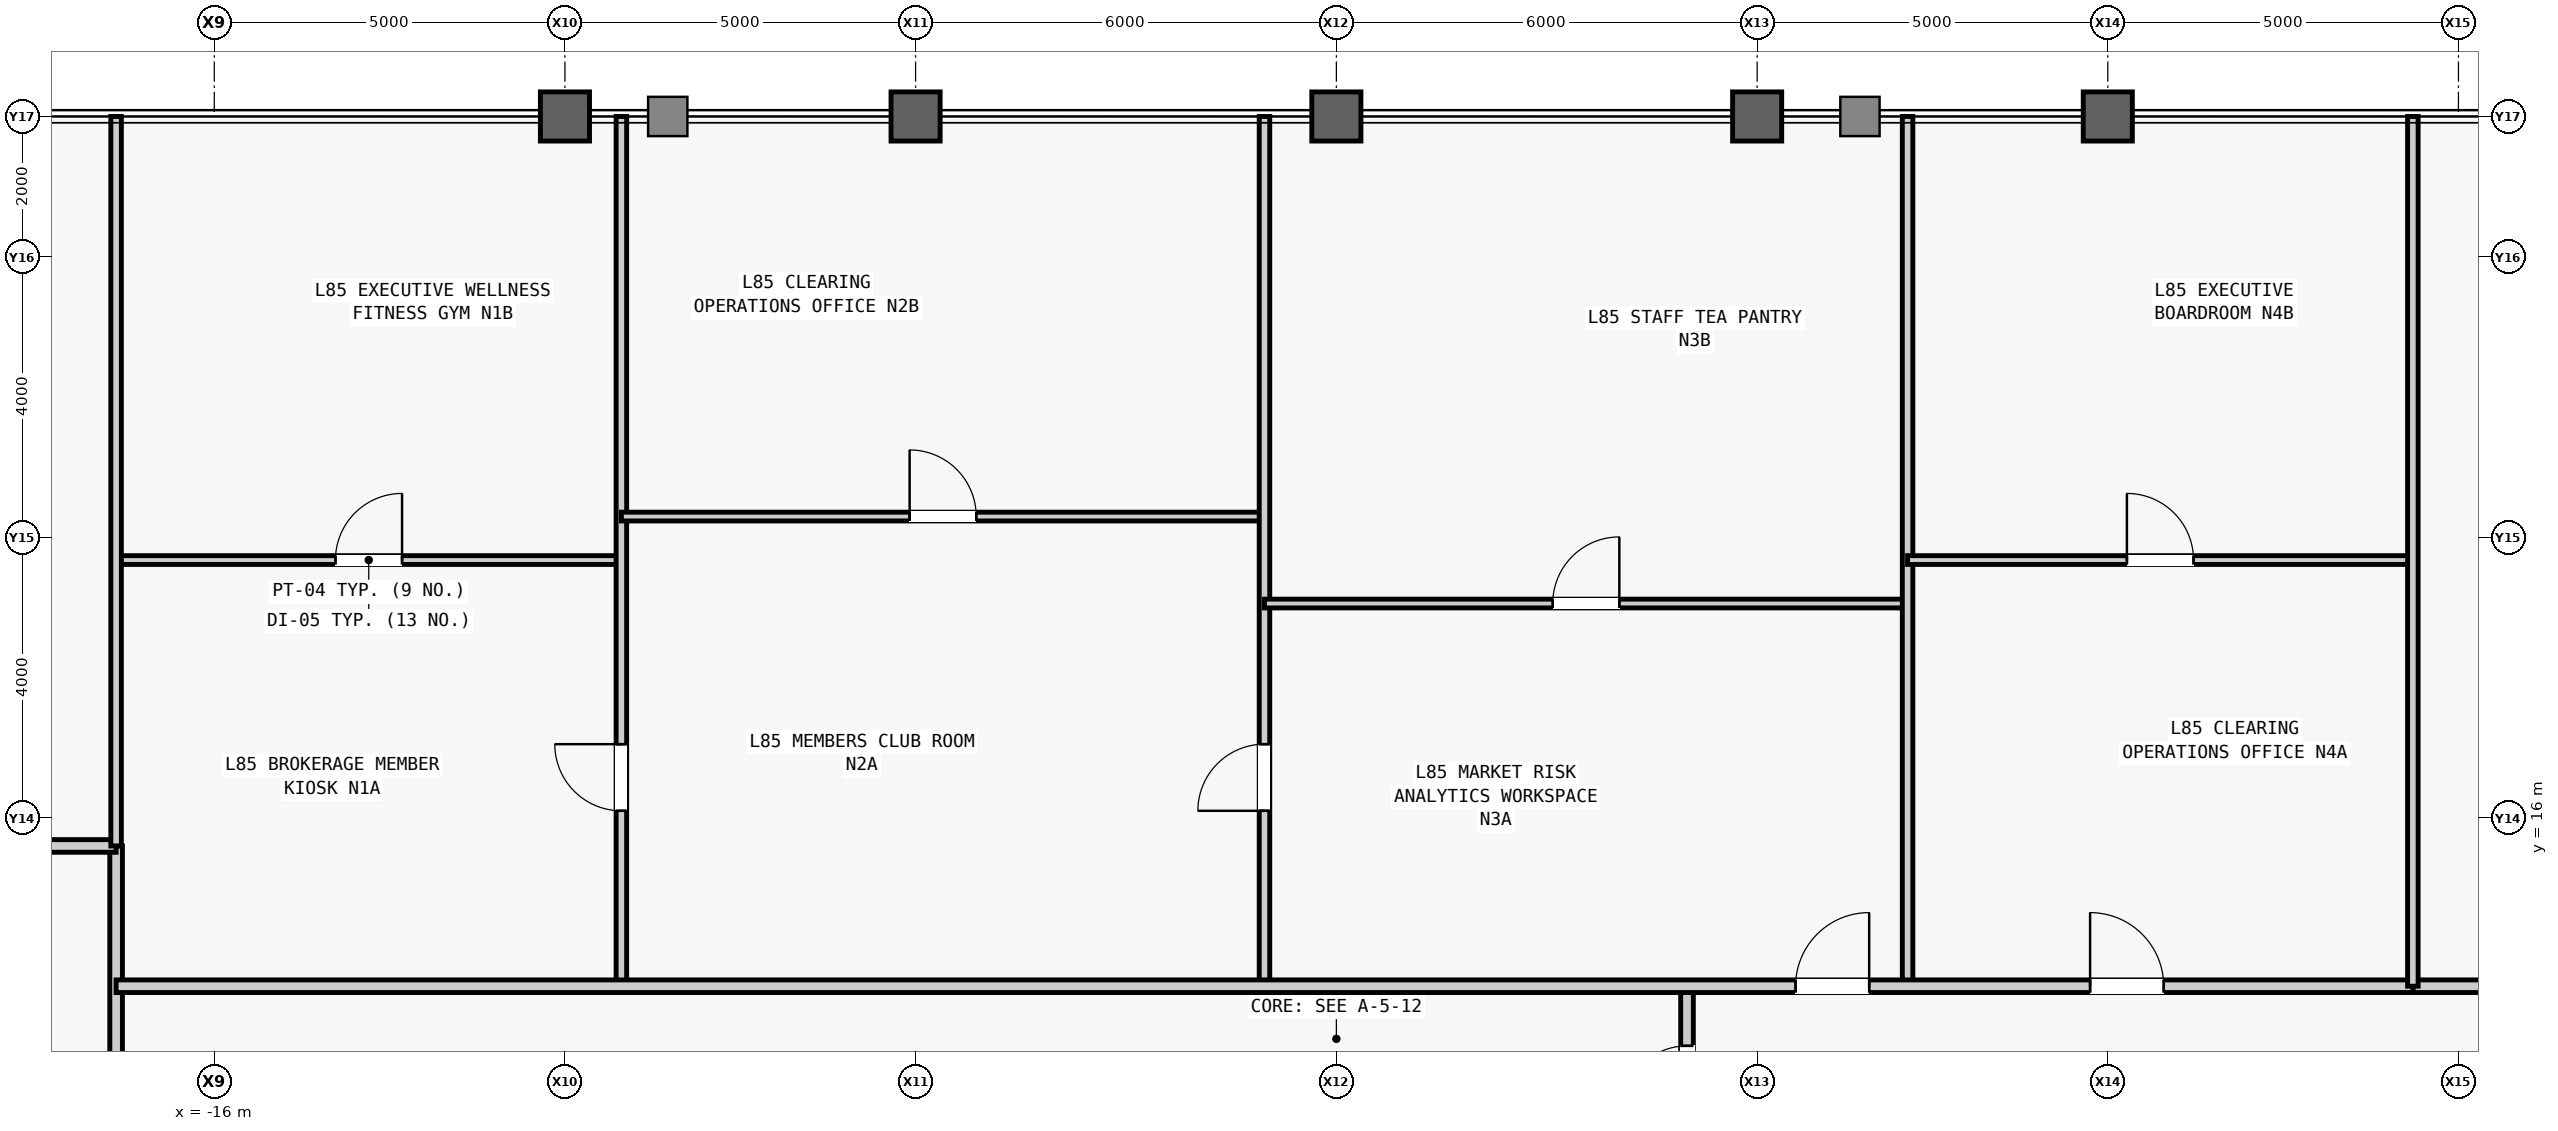
"""IFC4 building model, lengths in metres.
Left out: names, types, materials, properties, quantities, classifications, styles, units other than length and angle.
Written with IfcOpenShell. Run it as: python <this file> out.ifc"""

import sys

from ifc_helpers import new_model, si_unit, direction, frame, frame_2d, origin, origin_2d, place, context, subcontext, project, spatial, rectangle, hollow_rectangle, extrude, source, transform, mapped, element, fill, save


model = new_model("IFC4")
c1 = context("Model", 3, precision=1e-05, world=origin(), true_north=direction((0.0, 1.0)))
c2 = subcontext(c1, "Body", "Model", "MODEL_VIEW")
j1 = project(units=[si_unit("LENGTHUNIT", "METRE"), si_unit("PLANEANGLEUNIT", "RADIAN")], contexts=[c1])
p1 = place(None, origin())
s1 = spatial("IfcSite", under=j1, at=p1, CompositionType="ELEMENT")
p2 = place(p1, origin())
s2 = spatial("IfcBuilding", under=s1, at=p2, CompositionType="ELEMENT")
p3 = place(p2, frame((0.0, 0.0, 358.3)))
s3 = spatial("IfcBuildingStorey", under=s2, at=p3, CompositionType="ELEMENT", Elevation=358.3)
m1 = source(origin(), c2, "Body", "SweptSolid", [
    extrude(hollow_rectangle(XDim=0.7, YDim=0.7, WallThickness=0.04, at=origin_2d()), origin(), (0.0, 0.0, 1.0), 4.0),
])
for number, where, z_axis, x_axis in (
    (1, (-11.0, 26.0, 0.0), (0.0, 0.0, 1.0), (1.0, 0.0, 0.0)),
    (2, (-6.0, 26.0, 0.0), (0.0, 0.0, 1.0), (1.0, 0.0, 0.0)),
    (3, (0.0, 26.0, 0.0), (0.0, 0.0, 1.0), (1.0, 0.0, 0.0)),
    (4, (6.0, 26.0, 0.0), (0.0, 0.0, 1.0), (1.0, 0.0, 0.0)),
    (5, (11.0, 26.0, 0.0), (0.0, 0.0, 1.0), (1.0, 0.0, 0.0)),
):
    element("IfcColumn", number, at=place(p3, frame(where, z_axis=z_axis, x_axis=x_axis)), inside=s3, PredefinedType="COLUMN", context=c2, shape_type="MappedRepresentation", body=[
        mapped(m1, transform((0.0, 0.0, 0.0), scale=1.0)),
    ])
m2 = source(origin(), c2, "Body", "SweptSolid", [
    extrude(rectangle(XDim=8.4, YDim=0.18, at=frame_2d((4.2, 0.0))), origin(), (0.0, 0.0, 1.0), 3.74),
])
p4 = place(p3, frame((-17.4, 7.2, 0.0), z_axis=(0.0, 0.0, 1.0), x_axis=(0.0, 1.0, 0.0)))
e6 = element("IfcWall", 6, at=p4, inside=s3, PredefinedType="PARTITIONING", context=c2, shape_type="MappedRepresentation", body=[
    mapped(m2, transform((0.0, 0.0, 0.0), scale=1.0)),
])
m3 = source(origin(), c2, "Body", "SweptSolid", [
    extrude(rectangle(XDim=2.6, YDim=0.18, at=frame_2d((1.3, 0.0))), origin(), (0.0, 0.0, 1.0), 3.74),
])
p5 = place(p3, frame((5.0, 11.0, 0.0), z_axis=(0.0, 0.0, 1.0), x_axis=(0.0, 1.0, 0.0)))
e7 = element("IfcWall", 7, at=p5, inside=s3, PredefinedType="PARTITIONING", context=c2, shape_type="MappedRepresentation", body=[
    mapped(m3, transform((0.0, 0.0, 0.0), scale=1.0)),
])
m4 = source(origin(), c2, "Body", "SweptSolid", [
    extrude(rectangle(XDim=0.9, YDim=2.15, at=frame_2d((0.45, 1.075))), frame((0.0, 0.1, 0.0), z_axis=(0.0, -1.0, 0.0), x_axis=(1.0, 0.0, 0.0)), (0.0, 0.0, 1.0), 0.2),
])
p6 = place(p5, frame((0.85, 0.0, 0.0)))
e8 = element("IfcOpeningElement", 8, at=p6, cuts=e7, PredefinedType="OPENING", context=c2, shape_type="MappedRepresentation", body=[
    mapped(m4, transform((0.0, 0.0, 0.0), scale=1.0)),
])
m5 = source(origin(), c2, "Body", "SweptSolid", [
    extrude(rectangle(XDim=1.15, YDim=0.18, at=frame_2d((0.575, 0.0))), origin(), (0.0, 0.0, 1.0), 3.74),
])
p7 = place(p3, frame((-18.55, 15.6, 0.0), z_axis=(0.0, 0.0, 1.0), x_axis=(1.0, 0.0, 0.0)))
e9 = element("IfcWall", 9, at=p7, inside=s3, PredefinedType="PARTITIONING", context=c2, shape_type="MappedRepresentation", body=[
    mapped(m5, transform((0.0, 0.0, 0.0), scale=1.0)),
])
m6 = source(origin(), c2, "Body", "SweptSolid", [
    extrude(rectangle(XDim=2.4, YDim=0.18, at=frame_2d((1.2, 0.0))), origin(), (0.0, 0.0, 1.0), 3.74),
])
p8 = place(p3, frame((15.35, 13.6, 0.0), z_axis=(0.0, 0.0, 1.0), x_axis=(1.0, 0.0, 0.0)))
e10 = element("IfcWall", 10, at=p8, inside=s3, PredefinedType="PARTITIONING", context=c2, shape_type="MappedRepresentation", body=[
    mapped(m6, transform((0.0, 0.0, 0.0), scale=1.0)),
])
m7 = source(origin(), c2, "Body", "SweptSolid", [
    extrude(rectangle(XDim=7.205, YDim=0.125, at=frame_2d((3.603, 0.0))), origin(), (0.0, 0.0, 1.0), 3.393),
])
p9 = place(p3, frame((-17.4, 19.676, 0.0), z_axis=(0.0, 0.0, 1.0), x_axis=(1.0, 0.0, 0.0)))
e11 = element("IfcWall", 11, at=p9, inside=s3, PredefinedType="PARTITIONING", context=c2, shape_type="MappedRepresentation", body=[
    mapped(m7, transform((0.0, 0.0, 0.0), scale=1.0)),
])
m8 = source(origin(), c2, "Body", "SweptSolid", [
    extrude(rectangle(XDim=0.95, YDim=2.15, at=frame_2d((0.475, 1.075))), frame((0.0, 0.073, 0.0), z_axis=(0.0, -1.0, 0.0), x_axis=(1.0, 0.0, 0.0)), (0.0, 0.0, 1.0), 0.145),
])
p10 = place(p9, frame((3.127, 0.0, 0.0)))
e12 = element("IfcOpeningElement", 12, at=p10, cuts=e11, PredefinedType="OPENING", context=c2, shape_type="MappedRepresentation", body=[
    mapped(m8, transform((0.0, 0.0, 0.0), scale=1.0)),
])
m9 = source(origin(), c2, "Body", "SweptSolid", [
    extrude(rectangle(XDim=12.4, YDim=0.15, at=frame_2d((6.2, 0.0))), origin(), (0.0, 0.0, 1.0), 3.74),
])
p11 = place(p3, frame((-10.195, 13.6, 0.0), z_axis=(0.0, 0.0, 1.0), x_axis=(0.0, 1.0, 0.0)))
e13 = element("IfcWall", 13, at=p11, inside=s3, PredefinedType="PARTITIONING", context=c2, shape_type="MappedRepresentation", body=[
    mapped(m9, transform((0.0, 0.0, 0.0), scale=1.0)),
])
m10 = source(origin(), c2, "Body", "SweptSolid", [
    extrude(rectangle(XDim=0.95, YDim=2.15, at=frame_2d((0.475, 1.075))), frame((0.0, 0.085, 0.0), z_axis=(0.0, -1.0, 0.0), x_axis=(1.0, 0.0, 0.0)), (0.0, 0.0, 1.0), 0.17),
])
p12 = place(p11, frame((2.501, 0.0, 0.0)))
e14 = element("IfcOpeningElement", 14, at=p12, cuts=e13, PredefinedType="OPENING", context=c2, shape_type="MappedRepresentation", body=[
    mapped(m10, transform((0.0, 0.0, 0.0), scale=1.0)),
])
m11 = source(origin(), c2, "Body", "SweptSolid", [
    extrude(rectangle(XDim=9.17, YDim=0.125, at=frame_2d((4.585, 0.0))), origin(), (0.0, 0.0, 1.0), 3.74),
])
p13 = place(p3, frame((-10.195, 20.296, 0.0), z_axis=(0.0, 0.0, 1.0), x_axis=(1.0, 0.0, 0.0)))
e15 = element("IfcWall", 15, at=p13, inside=s3, PredefinedType="PARTITIONING", context=c2, shape_type="MappedRepresentation", body=[
    mapped(m11, transform((0.0, 0.0, 0.0), scale=1.0)),
])
p14 = place(p13, frame((4.11, 0.0, 0.0)))
e16 = element("IfcOpeningElement", 16, at=p14, cuts=e15, PredefinedType="OPENING", context=c2, shape_type="MappedRepresentation", body=[
    mapped(m8, transform((0.0, 0.0, 0.0), scale=1.0)),
])
p15 = place(p3, frame((-1.025, 13.6, 0.0), z_axis=(0.0, 0.0, 1.0), x_axis=(0.0, 1.0, 0.0)))
e17 = element("IfcWall", 17, at=p15, inside=s3, PredefinedType="PARTITIONING", context=c2, shape_type="MappedRepresentation", body=[
    mapped(m9, transform((0.0, 0.0, 0.0), scale=1.0)),
])
p16 = place(p15, frame((2.501, 0.0, 0.0)))
e18 = element("IfcOpeningElement", 18, at=p16, cuts=e17, PredefinedType="OPENING", context=c2, shape_type="MappedRepresentation", body=[
    mapped(m10, transform((0.0, 0.0, 0.0), scale=1.0)),
])
m12 = source(origin(), c2, "Body", "SweptSolid", [
    extrude(rectangle(XDim=9.17, YDim=0.125, at=frame_2d((4.585, 0.0))), origin(), (0.0, 0.0, 1.0), 3.74),
])
p17 = place(p3, frame((-1.025, 19.056, 0.0), z_axis=(0.0, 0.0, 1.0), x_axis=(1.0, 0.0, 0.0)))
e19 = element("IfcWall", 19, at=p17, inside=s3, PredefinedType="PARTITIONING", context=c2, shape_type="MappedRepresentation", body=[
    mapped(m12, transform((0.0, 0.0, 0.0), scale=1.0)),
])
p18 = place(p17, frame((4.11, 0.0, 0.0)))
e20 = element("IfcOpeningElement", 20, at=p18, cuts=e19, PredefinedType="OPENING", context=c2, shape_type="MappedRepresentation", body=[
    mapped(m8, transform((0.0, 0.0, 0.0), scale=1.0)),
])
p19 = place(p3, frame((8.145, 13.6, 0.0), z_axis=(0.0, 0.0, 1.0), x_axis=(0.0, 1.0, 0.0)))
e21 = element("IfcWall", 21, at=p19, inside=s3, PredefinedType="PARTITIONING", context=c2, shape_type="MappedRepresentation", body=[
    mapped(m9, transform((0.0, 0.0, 0.0), scale=1.0)),
])
m13 = source(origin(), c2, "Body", "SweptSolid", [
    extrude(rectangle(XDim=7.205, YDim=0.125, at=frame_2d((3.603, 0.0))), origin(), (0.0, 0.0, 1.0), 3.393),
])
p20 = place(p3, frame((8.145, 19.676, 0.0), z_axis=(0.0, 0.0, 1.0), x_axis=(1.0, 0.0, 0.0)))
e22 = element("IfcWall", 22, at=p20, inside=s3, PredefinedType="PARTITIONING", context=c2, shape_type="MappedRepresentation", body=[
    mapped(m13, transform((0.0, 0.0, 0.0), scale=1.0)),
])
p21 = place(p20, frame((3.127, 0.0, 0.0)))
e23 = element("IfcOpeningElement", 23, at=p21, cuts=e22, PredefinedType="OPENING", context=c2, shape_type="MappedRepresentation", body=[
    mapped(m8, transform((0.0, 0.0, 0.0), scale=1.0)),
])
m14 = source(origin(), c2, "Body", "SweptSolid", [
    extrude(rectangle(XDim=32.75, YDim=0.18, at=frame_2d((16.375, 0.0))), origin(), (0.0, 0.0, 1.0), 3.74),
])
p22 = place(p3, frame((-17.4, 13.6, 0.0), z_axis=(0.0, 0.0, 1.0), x_axis=(1.0, 0.0, 0.0)))
e24 = element("IfcWall", 24, at=p22, inside=s3, PredefinedType="PARTITIONING", context=c2, shape_type="MappedRepresentation", body=[
    mapped(m14, transform((0.0, 0.0, 0.0), scale=1.0)),
])
m15 = source(origin(), c2, "Body", "SweptSolid", [
    extrude(rectangle(XDim=1.05, YDim=2.2, at=frame_2d((0.525, 1.1))), frame((0.0, 0.1, 0.0), z_axis=(0.0, -1.0, 0.0), x_axis=(1.0, 0.0, 0.0)), (0.0, 0.0, 1.0), 0.2),
])
p23 = place(p22, frame((23.948, 0.0, 0.0)))
e25 = element("IfcOpeningElement", 25, at=p23, cuts=e24, PredefinedType="OPENING", context=c2, shape_type="MappedRepresentation", body=[
    mapped(m15, transform((0.0, 0.0, 0.0), scale=1.0)),
])
p24 = place(p22, frame((28.147, 0.0, 0.0)))
e26 = element("IfcOpeningElement", 26, at=p24, cuts=e24, PredefinedType="OPENING", context=c2, shape_type="MappedRepresentation", body=[
    mapped(m15, transform((0.0, 0.0, 0.0), scale=1.0)),
])
m16 = source(origin(), c2, "Body", "SweptSolid", [
    extrude(rectangle(XDim=10.4, YDim=0.15, at=frame_2d((5.2, 0.0))), origin(), (0.0, 0.0, 1.0), 3.74),
])
p25 = place(p3, frame((-17.4, 15.6, 0.0), z_axis=(0.0, 0.0, 1.0), x_axis=(0.0, 1.0, 0.0)))
e27 = element("IfcWall", 27, at=p25, inside=s3, PredefinedType="PARTITIONING", context=c2, shape_type="MappedRepresentation", body=[
    mapped(m16, transform((0.0, 0.0, 0.0), scale=1.0)),
])
p26 = place(p3, frame((15.35, 13.6, 0.0), z_axis=(0.0, 0.0, 1.0), x_axis=(0.0, 1.0, 0.0)))
e28 = element("IfcWall", 28, at=p26, inside=s3, PredefinedType="PARTITIONING", context=c2, shape_type="MappedRepresentation", body=[
    mapped(m9, transform((0.0, 0.0, 0.0), scale=1.0)),
])
m17 = source(origin(), c2, "Body", "SweptSolid", [
    extrude(rectangle(XDim=0.9, YDim=2.15, at=frame_2d((0.45, 1.075))), frame((0.0, 0.025, 0.0), z_axis=(0.0, -1.0, 0.0), x_axis=(1.0, 0.0, 0.0)), (0.0, 0.0, 1.0), 0.05),
])
p27 = place(p6, origin())
e29 = element("IfcDoor", 29, at=p27, inside=s3, OperationType="SINGLE_SWING_LEFT", PredefinedType="DOOR", context=c2, shape_type="MappedRepresentation", body=[
    mapped(m17, transform((0.0, 0.0, 0.0), scale=1.0)),
])
fill(e8, e29)
m18 = source(origin(), c2, "Body", "SweptSolid", [
    extrude(rectangle(XDim=0.95, YDim=2.15, at=frame_2d((0.475, 1.075))), frame((0.0, 0.025, 0.0), z_axis=(0.0, -1.0, 0.0), x_axis=(1.0, 0.0, 0.0)), (0.0, 0.0, 1.0), 0.05),
])
p28 = place(p10, origin())
e30 = element("IfcDoor", 30, at=p28, inside=s3, OperationType="SINGLE_SWING_RIGHT", PredefinedType="DOOR", context=c2, shape_type="MappedRepresentation", body=[
    mapped(m18, transform((0.0, 0.0, 0.0), scale=1.0)),
])
fill(e12, e30)
p29 = place(p12, origin())
e31 = element("IfcDoor", 31, at=p29, inside=s3, OperationType="SINGLE_SWING_RIGHT", PredefinedType="DOOR", context=c2, shape_type="MappedRepresentation", body=[
    mapped(m18, transform((0.0, 0.0, 0.0), scale=1.0)),
])
fill(e14, e31)
p30 = place(p14, origin())
e32 = element("IfcDoor", 32, at=p30, inside=s3, OperationType="SINGLE_SWING_LEFT", PredefinedType="DOOR", context=c2, shape_type="MappedRepresentation", body=[
    mapped(m18, transform((0.0, 0.0, 0.0), scale=1.0)),
])
fill(e16, e32)
p31 = place(p16, origin())
e33 = element("IfcDoor", 33, at=p31, inside=s3, OperationType="SINGLE_SWING_LEFT", PredefinedType="DOOR", context=c2, shape_type="MappedRepresentation", body=[
    mapped(m18, transform((0.0, 0.0, 0.0), scale=1.0)),
])
fill(e18, e33)
p32 = place(p18, origin())
e34 = element("IfcDoor", 34, at=p32, inside=s3, OperationType="SINGLE_SWING_RIGHT", PredefinedType="DOOR", context=c2, shape_type="MappedRepresentation", body=[
    mapped(m18, transform((0.0, 0.0, 0.0), scale=1.0)),
])
fill(e20, e34)
p33 = place(p21, origin())
e35 = element("IfcDoor", 35, at=p33, inside=s3, OperationType="SINGLE_SWING_LEFT", PredefinedType="DOOR", context=c2, shape_type="MappedRepresentation", body=[
    mapped(m18, transform((0.0, 0.0, 0.0), scale=1.0)),
])
fill(e23, e35)
m19 = source(origin(), c2, "Body", "SweptSolid", [
    extrude(rectangle(XDim=1.05, YDim=2.2, at=frame_2d((0.525, 1.1))), frame((0.0, 0.025, 0.0), z_axis=(0.0, -1.0, 0.0), x_axis=(1.0, 0.0, 0.0)), (0.0, 0.0, 1.0), 0.05),
])
p34 = place(p23, origin())
e36 = element("IfcDoor", 36, at=p34, inside=s3, OperationType="SINGLE_SWING_RIGHT", PredefinedType="DOOR", context=c2, shape_type="MappedRepresentation", body=[
    mapped(m19, transform((0.0, 0.0, 0.0), scale=1.0)),
])
fill(e25, e36)
p35 = place(p24, origin())
e37 = element("IfcDoor", 37, at=p35, inside=s3, OperationType="SINGLE_SWING_LEFT", PredefinedType="DOOR", context=c2, shape_type="MappedRepresentation", body=[
    mapped(m19, transform((0.0, 0.0, 0.0), scale=1.0)),
])
fill(e26, e37)
save(model, sys.argv[1])
